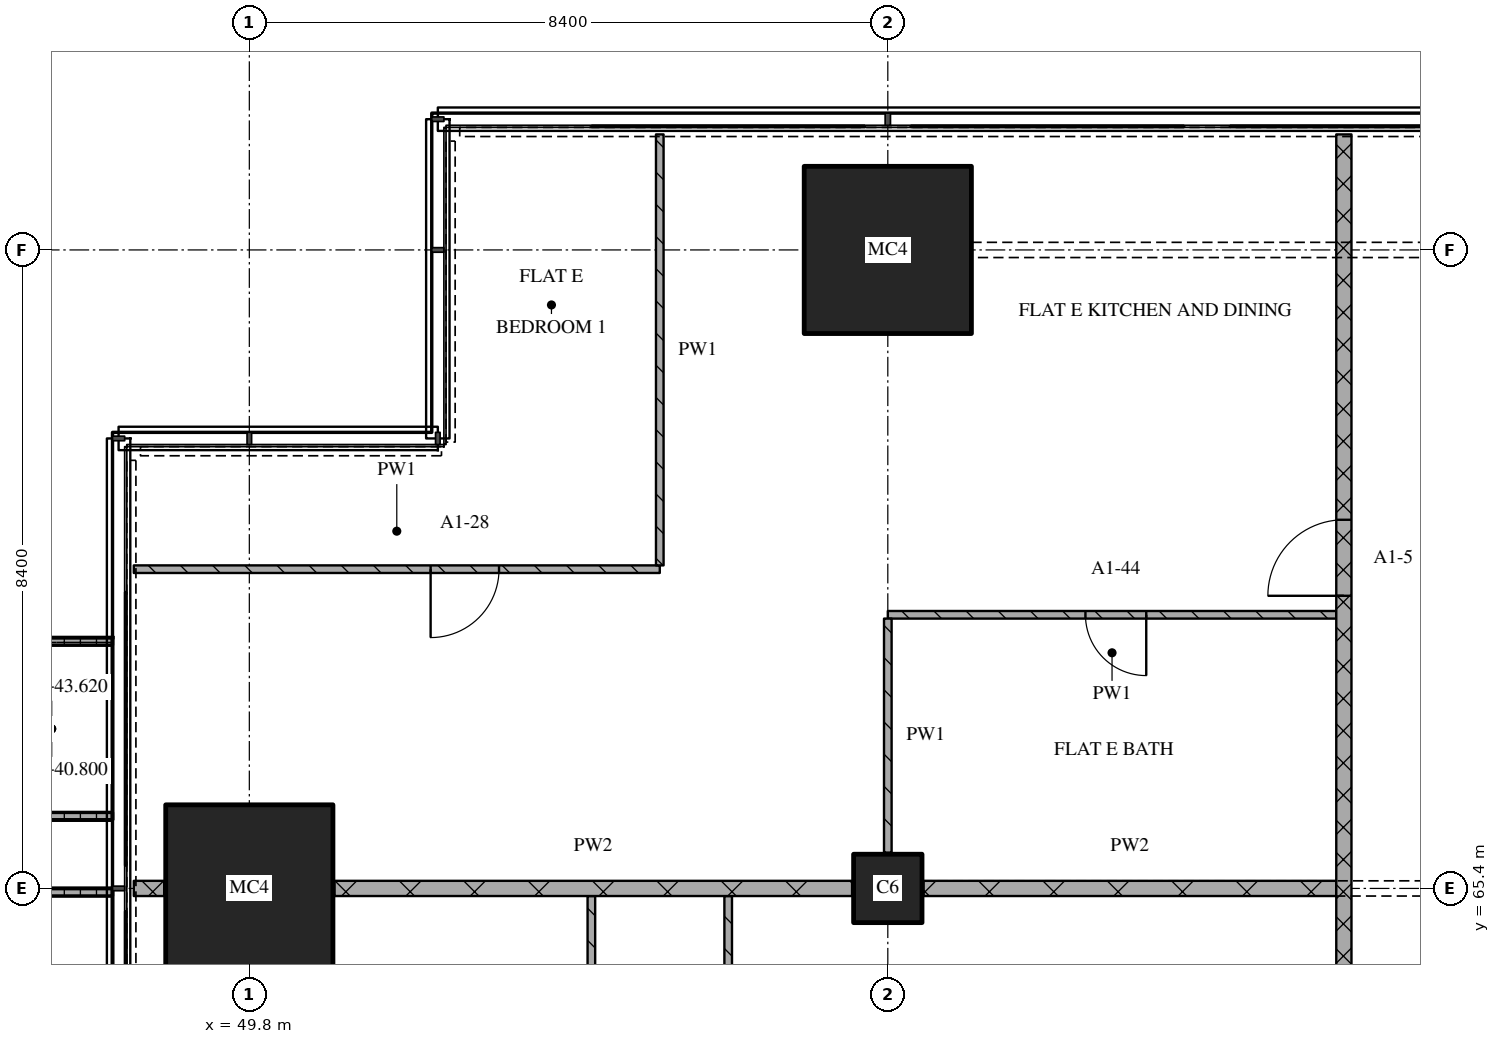
"""IFC4 building model, lengths in metres.
Left out: names, types, materials, properties, quantities, classifications, styles, units other than length and angle.
Written with IfcOpenShell. Run it as: python <this file> out.ifc"""

import sys

from ifc_helpers import new_model, si_unit, direction, frame, frame_2d, origin, origin_2d, place, context, subcontext, project, spatial, polyline, rectangle, outline, extrude, element, fill, save


model = new_model("IFC4")
c1 = context("Model", 3, precision=1e-05, world=origin(), true_north=direction((0.0, 1.0)))
c2 = subcontext(c1, "Body", "Model", "MODEL_VIEW")
j1 = project(units=[si_unit("LENGTHUNIT", "METRE"), si_unit("PLANEANGLEUNIT", "RADIAN")], contexts=[c1])
p1 = place(None, origin())
s1 = spatial("IfcSite", under=j1, at=p1, CompositionType="ELEMENT")
p2 = place(p1, origin())
s2 = spatial("IfcBuilding", under=s1, at=p2, CompositionType="ELEMENT")
p3 = place(p2, frame((0.0, 0.0, 40.8)))
s3 = spatial("IfcBuildingStorey", under=s2, at=p3, CompositionType="ELEMENT", Elevation=40.8)
p4 = place(p3, frame((49.8, 65.4, 0.0), z_axis=(0.0, 0.0, 1.0), x_axis=(1.0, 0.0, 0.0)))
e1 = element("IfcColumn", 1, at=p4, inside=s3, PredefinedType="COLUMN", context=c2, shape_type="SweptSolid", body=[
    extrude(rectangle(XDim=2.2, YDim=2.2, at=origin_2d()), origin(), (0.0, 0.0, 1.0), 3.6),
])
p5 = place(p3, frame((58.2, 65.4, 0.0), z_axis=(0.0, 0.0, 1.0), x_axis=(1.0, 0.0, 0.0)))
e2 = element("IfcColumn", 2, at=p5, inside=s3, PredefinedType="COLUMN", context=c2, shape_type="SweptSolid", body=[
    extrude(rectangle(XDim=0.9, YDim=0.9, at=origin_2d()), origin(), (0.0, 0.0, 1.0), 3.6),
])
p6 = place(p3, frame((58.2, 73.8, 0.0), z_axis=(0.0, 0.0, 1.0), x_axis=(1.0, 0.0, 0.0)))
e3 = element("IfcColumn", 3, at=p6, inside=s3, PredefinedType="COLUMN", context=c2, shape_type="SweptSolid", body=[
    extrude(rectangle(XDim=2.2, YDim=2.2, at=origin_2d()), origin(), (0.0, 0.0, 1.0), 3.6),
])
p7 = place(p3, origin())
e4 = element("IfcWall", 4, at=p7, inside=s3, PredefinedType="SOLIDWALL", context=c2, shape_type="SweptSolid", body=[
    extrude(outline(polyline([(48.0, 68.7), (48.0, 68.6), (46.5, 68.6), (46.5, 66.4), (48.0, 66.4), (48.0, 66.3), (46.4, 66.3), (46.4, 68.7), (48.0, 68.7)])), origin(), (0.0, 0.0, 1.0), 1.0),
])
p8 = place(p3, origin())
e5 = element("IfcWall", 5, at=p8, inside=s3, PredefinedType="SOLIDWALL", context=c2, shape_type="SweptSolid", body=[
    extrude(outline(polyline([(48.0, 65.4), (48.0, 65.3), (46.367, 65.3), (46.367, 61.3), (48.0, 61.3), (48.0, 61.2), (46.267, 61.2), (46.267, 65.4), (48.0, 65.4)])), origin(), (0.0, 0.0, 1.0), 1.0),
])
p9 = place(p3, frame((48.28, 65.4, 0.0), z_axis=(0.0, 0.0, 1.0), x_axis=(1.0, 0.0, 0.0)))
e6 = element("IfcWall", 6, at=p9, inside=s3, PredefinedType="PARTITIONING", context=c2, shape_type="SweptSolid", body=[
    extrude(rectangle(XDim=0.4, YDim=0.2, at=frame_2d((0.2, 0.0))), origin(), (0.0, 0.0, 1.0), 3.32),
])
p10 = place(p3, frame((50.92, 65.4, 0.0), z_axis=(0.0, 0.0, 1.0), x_axis=(1.0, 0.0, 0.0)))
e7 = element("IfcWall", 7, at=p10, inside=s3, PredefinedType="PARTITIONING", context=c2, shape_type="SweptSolid", body=[
    extrude(rectangle(XDim=6.81, YDim=0.2, at=frame_2d((3.405, 0.0))), origin(), (0.0, 0.0, 1.0), 3.32),
])
p11 = place(p3, frame((58.67, 65.4, 0.0), z_axis=(0.0, 0.0, 1.0), x_axis=(1.0, 0.0, 0.0)))
e8 = element("IfcWall", 8, at=p11, inside=s3, PredefinedType="PARTITIONING", context=c2, shape_type="SweptSolid", body=[
    extrude(rectangle(XDim=5.43, YDim=0.2, at=frame_2d((2.715, 0.0))), origin(), (0.0, 0.0, 1.0), 2.82),
])
p12 = place(p3, frame((64.1, 69.0, 0.0), z_axis=(0.0, 0.0, 1.0), x_axis=(-1.0, 0.0, 0.0)))
e9 = element("IfcWall", 9, at=p12, inside=s3, PredefinedType="PARTITIONING", context=c2, shape_type="SweptSolid", body=[
    extrude(rectangle(XDim=5.9, YDim=0.1, at=frame_2d((2.95, 0.0))), origin(), (0.0, 0.0, 1.0), 3.32),
])
p13 = place(p12, frame((2.5, 0.0, 0.0)))
e10 = element("IfcOpeningElement", 10, at=p13, cuts=e9, PredefinedType="OPENING", context=c2, shape_type="SweptSolid", body=[
    extrude(rectangle(XDim=0.8, YDim=2.1, at=frame_2d((0.4, 1.05))), frame((0.0, 0.06, 0.0), z_axis=(0.0, -1.0, 0.0), x_axis=(1.0, 0.0, 0.0)), (0.0, 0.0, 1.0), 0.12),
])
p14 = place(p3, frame((48.28, 69.6, 0.0), z_axis=(0.0, 0.0, 1.0), x_axis=(1.0, 0.0, 0.0)))
e11 = element("IfcWall", 11, at=p14, inside=s3, PredefinedType="PARTITIONING", context=c2, shape_type="SweptSolid", body=[
    extrude(rectangle(XDim=6.92, YDim=0.1, at=frame_2d((3.46, 0.0))), origin(), (0.0, 0.0, 1.0), 3.32),
])
p15 = place(p14, frame((3.905, 0.0, 0.0)))
e12 = element("IfcOpeningElement", 12, at=p15, cuts=e11, PredefinedType="OPENING", context=c2, shape_type="SweptSolid", body=[
    extrude(rectangle(XDim=0.9, YDim=2.1, at=frame_2d((0.45, 1.05))), frame((0.0, 0.06, 0.0), z_axis=(0.0, -1.0, 0.0), x_axis=(1.0, 0.0, 0.0)), (0.0, 0.0, 1.0), 0.12),
])
p16 = place(p3, frame((54.3, 52.85, 0.0), z_axis=(0.0, 0.0, 1.0), x_axis=(0.0, 1.0, 0.0)))
e13 = element("IfcWall", 13, at=p16, inside=s3, PredefinedType="PARTITIONING", context=c2, shape_type="SweptSolid", body=[
    extrude(rectangle(XDim=12.45, YDim=0.1, at=frame_2d((6.225, 0.0))), origin(), (0.0, 0.0, 1.0), 3.32),
])
p17 = place(p16, frame((10.0, 0.0, 0.0)))
e14 = element("IfcOpeningElement", 14, at=p17, cuts=e13, PredefinedType="OPENING", context=c2, shape_type="SweptSolid", body=[
    extrude(rectangle(XDim=0.9, YDim=2.1, at=frame_2d((0.45, 1.05))), frame((0.0, 0.06, 0.0), z_axis=(0.0, -1.0, 0.0), x_axis=(1.0, 0.0, 0.0)), (0.0, 0.0, 1.0), 0.12),
])
p18 = place(p3, frame((55.2, 75.32, 0.0), z_axis=(0.0, 0.0, 1.0), x_axis=(0.0, -1.0, 0.0)))
e15 = element("IfcWall", 15, at=p18, inside=s3, PredefinedType="PARTITIONING", context=c2, shape_type="SweptSolid", body=[
    extrude(rectangle(XDim=5.67, YDim=0.1, at=frame_2d((2.835, 0.0))), origin(), (0.0, 0.0, 1.0), 3.32),
])
p19 = place(p3, frame((56.1, 65.3, 0.0), z_axis=(0.0, 0.0, 1.0), x_axis=(0.0, -1.0, 0.0)))
e16 = element("IfcWall", 16, at=p19, inside=s3, PredefinedType="PARTITIONING", context=c2, shape_type="SweptSolid", body=[
    extrude(rectangle(XDim=7.088, YDim=0.1, at=frame_2d((3.544, 0.0))), origin(), (0.0, 0.0, 1.0), 3.32),
])
p20 = place(p19, frame((3.069, 0.0, 0.0)))
e17 = element("IfcOpeningElement", 17, at=p20, cuts=e16, PredefinedType="OPENING", context=c2, shape_type="SweptSolid", body=[
    extrude(rectangle(XDim=0.9, YDim=2.1, at=frame_2d((0.45, 1.05))), frame((0.0, 0.06, 0.0), z_axis=(0.0, -1.0, 0.0), x_axis=(1.0, 0.0, 0.0)), (0.0, 0.0, 1.0), 0.12),
])
p21 = place(p3, frame((58.2, 68.95, 0.0), z_axis=(0.0, 0.0, 1.0), x_axis=(0.0, -1.0, 0.0)))
e18 = element("IfcWall", 18, at=p21, inside=s3, PredefinedType="PARTITIONING", context=c2, shape_type="SweptSolid", body=[
    extrude(rectangle(XDim=3.08, YDim=0.1, at=frame_2d((1.54, 0.0))), origin(), (0.0, 0.0, 1.0), 3.32),
])
p22 = place(p3, frame((64.2, 43.3, 0.0), z_axis=(0.0, 0.0, 1.0), x_axis=(0.0, 1.0, 0.0)))
e19 = element("IfcWall", 19, at=p22, inside=s3, PredefinedType="PARTITIONING", context=c2, shape_type="SweptSolid", body=[
    extrude(rectangle(XDim=32.02, YDim=0.2, at=frame_2d((16.01, 0.0))), origin(), (0.0, 0.0, 1.0), 3.32),
])
p23 = place(p22, frame((8.55, 0.0, 0.0)))
e20 = element("IfcOpeningElement", 20, at=p23, cuts=e19, PredefinedType="OPENING", context=c2, shape_type="SweptSolid", body=[
    extrude(rectangle(XDim=1.0, YDim=2.1, at=frame_2d((0.5, 1.05))), frame((0.0, 0.11, 0.0), z_axis=(0.0, -1.0, 0.0), x_axis=(1.0, 0.0, 0.0)), (0.0, 0.0, 1.0), 0.22),
])
p24 = place(p22, frame((25.95, 0.0, 0.0)))
e21 = element("IfcOpeningElement", 21, at=p24, cuts=e19, PredefinedType="OPENING", context=c2, shape_type="SweptSolid", body=[
    extrude(rectangle(XDim=1.0, YDim=2.1, at=frame_2d((0.5, 1.05))), frame((0.0, 0.11, 0.0), z_axis=(0.0, -1.0, 0.0), x_axis=(1.0, 0.0, 0.0)), (0.0, 0.0, 1.0), 0.22),
])
p25 = place(p13, origin())
e22 = element("IfcDoor", 22, at=p25, inside=s3, OperationType="SINGLE_SWING_LEFT", PredefinedType="DOOR", context=c2, shape_type="SweptSolid", body=[
    extrude(rectangle(XDim=0.8, YDim=2.1, at=frame_2d((0.4, 1.05))), frame((0.0, 0.025, 0.0), z_axis=(0.0, -1.0, 0.0), x_axis=(1.0, 0.0, 0.0)), (0.0, 0.0, 1.0), 0.05),
])
fill(e10, e22)
p26 = place(p15, origin())
e23 = element("IfcDoor", 23, at=p26, inside=s3, OperationType="SINGLE_SWING_RIGHT", PredefinedType="DOOR", context=c2, shape_type="SweptSolid", body=[
    extrude(rectangle(XDim=0.9, YDim=2.1, at=frame_2d((0.45, 1.05))), frame((0.0, 0.025, 0.0), z_axis=(0.0, -1.0, 0.0), x_axis=(1.0, 0.0, 0.0)), (0.0, 0.0, 1.0), 0.05),
])
fill(e12, e23)
p27 = place(p24, origin())
e24 = element("IfcDoor", 24, at=p27, inside=s3, OperationType="SINGLE_SWING_LEFT", PredefinedType="DOOR", context=c2, shape_type="SweptSolid", body=[
    extrude(rectangle(XDim=1.0, YDim=2.1, at=frame_2d((0.5, 1.05))), frame((0.0, 0.025, 0.0), z_axis=(0.0, -1.0, 0.0), x_axis=(1.0, 0.0, 0.0)), (0.0, 0.0, 1.0), 0.05),
])
fill(e21, e24)
save(model, sys.argv[1])
